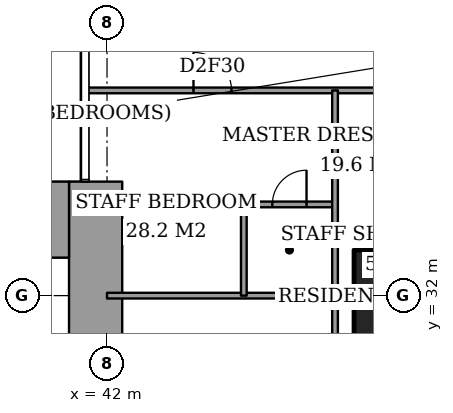
"""IFC4 building model, lengths in metres.
Left out: names, types, materials, properties, quantities, classifications, styles, units other than length and angle.
Written with IfcOpenShell. Run it as: python <this file> out.ifc"""

import sys

from ifc_helpers import new_model, si_unit, direction, frame, frame_2d, origin, origin_2d, place, context, subcontext, project, spatial, rectangle, extrude, element, fill, save


model = new_model("IFC4")
c1 = context("Model", 3, precision=1e-05, world=origin(), true_north=direction((0.0, 1.0)))
c2 = subcontext(c1, "Body", "Model", "MODEL_VIEW")
j1 = project(units=[si_unit("LENGTHUNIT", "METRE"), si_unit("PLANEANGLEUNIT", "RADIAN")], contexts=[c1])
p1 = place(None, origin())
s1 = spatial("IfcSite", under=j1, at=p1, CompositionType="ELEMENT")
p2 = place(p1, origin())
s2 = spatial("IfcBuilding", under=s1, at=p2, CompositionType="ELEMENT")
p3 = place(p2, frame((0.0, 0.0, 153.8)))
s3 = spatial("IfcBuildingStorey", under=s2, at=p3, CompositionType="ELEMENT", Elevation=153.8)
p4 = place(p3, frame((50.0, 32.0, 0.0), z_axis=(0.0, 0.0, 1.0), x_axis=(1.0, 0.0, 0.0)))
e1 = element("IfcColumn", 1, at=p4, inside=s3, PredefinedType="COLUMN", context=c2, shape_type="SweptSolid", body=[
    extrude(rectangle(XDim=3.0, YDim=2.4, at=origin_2d()), origin(), (0.0, 0.0, 1.0), 3.6),
])
p5 = place(p3, frame((37.85, 34.0, 0.0), z_axis=(0.0, 0.0, 1.0), x_axis=(1.0, 0.0, 0.0)))
e2 = element("IfcWall", 2, at=p5, inside=s3, PredefinedType="SHEAR", context=c2, shape_type="SweptSolid", body=[
    extrude(rectangle(XDim=3.15, YDim=2.0, at=frame_2d((1.575, 0.0))), origin(), (0.0, 0.0, 1.0), 3.6),
])
p6 = place(p3, frame((41.7, 24.85, 0.0), z_axis=(0.0, 0.0, 1.0), x_axis=(0.0, 1.0, 0.0)))
e3 = element("IfcWall", 3, at=p6, inside=s3, PredefinedType="SHEAR", context=c2, shape_type="SweptSolid", body=[
    extrude(rectangle(XDim=10.15, YDim=1.4, at=frame_2d((5.075, 0.0))), origin(), (0.0, 0.0, 1.0), 3.6),
])
p7 = place(p3, frame((48.0, 31.95, 0.0), z_axis=(0.0, 0.0, 1.0), x_axis=(1.0, 0.0, 0.0)))
e4 = element("IfcWall", 4, at=p7, inside=s3, PredefinedType="PARTITIONING", context=c2, shape_type="SweptSolid", body=[
    extrude(rectangle(XDim=0.5, YDim=0.15, at=frame_2d((0.25, 0.0))), origin(), (0.0, 0.0, 1.0), 2.634),
])
p8 = place(p3, frame((42.0, 32.0, 0.0), z_axis=(0.0, 0.0, 1.0), x_axis=(1.0, 0.0, 0.0)))
e5 = element("IfcWall", 5, at=p8, inside=s3, PredefinedType="PARTITIONING", context=c2, shape_type="SweptSolid", body=[
    extrude(rectangle(XDim=6.0, YDim=0.15, at=frame_2d((3.0, 0.0))), origin(), (0.0, 0.0, 1.0), 2.634),
])
p9 = place(p3, frame((45.6, 34.4, 0.0), z_axis=(0.0, 0.0, 1.0), x_axis=(1.0, 0.0, 0.0)))
e6 = element("IfcWall", 6, at=p9, inside=s3, PredefinedType="PARTITIONING", context=c2, shape_type="SweptSolid", body=[
    extrude(rectangle(XDim=2.4, YDim=0.15, at=frame_2d((1.2, 0.0))), origin(), (0.0, 0.0, 1.0), 3.35),
])
p10 = place(p9, frame((0.75, 0.0, 0.0)))
e7 = element("IfcOpeningElement", 7, at=p10, cuts=e6, PredefinedType="OPENING", context=c2, shape_type="SweptSolid", body=[
    extrude(rectangle(XDim=0.9, YDim=2.1, at=frame_2d((0.45, 1.05))), frame((0.0, 0.085, 0.0), z_axis=(0.0, -1.0, 0.0), x_axis=(1.0, 0.0, 0.0)), (0.0, 0.0, 1.0), 0.17),
])
p11 = place(p3, frame((41.439, 37.4, 0.0), z_axis=(0.0, 0.0, 1.0), x_axis=(1.0, 0.0, 0.0)))
e8 = element("IfcWall", 8, at=p11, inside=s3, PredefinedType="PARTITIONING", context=c2, shape_type="SweptSolid", body=[
    extrude(rectangle(XDim=25.011, YDim=0.15, at=frame_2d((12.505, 0.0))), origin(), (0.0, 0.0, 1.0), 3.35),
])
p12 = place(p11, frame((10.761, 0.0, 0.0)))
e9 = element("IfcOpeningElement", 9, at=p12, cuts=e8, PredefinedType="OPENING", context=c2, shape_type="SweptSolid", body=[
    extrude(rectangle(XDim=1.0, YDim=2.1, at=frame_2d((0.5, 1.05))), frame((0.0, 0.085, 0.0), z_axis=(0.0, -1.0, 0.0), x_axis=(1.0, 0.0, 0.0)), (0.0, 0.0, 1.0), 0.17),
])
p13 = place(p11, frame((20.924, 0.0, 0.0)))
e10 = element("IfcOpeningElement", 10, at=p13, cuts=e8, PredefinedType="OPENING", context=c2, shape_type="SweptSolid", body=[
    extrude(rectangle(XDim=1.0, YDim=2.1, at=frame_2d((0.5, 1.05))), frame((0.0, 0.085, 0.0), z_axis=(0.0, -1.0, 0.0), x_axis=(1.0, 0.0, 0.0)), (0.0, 0.0, 1.0), 0.17),
])
p14 = place(p11, frame((15.749, 0.0, 0.0)))
e11 = element("IfcOpeningElement", 11, at=p14, cuts=e8, PredefinedType="OPENING", context=c2, shape_type="SweptSolid", body=[
    extrude(rectangle(XDim=0.9, YDim=2.1, at=frame_2d((0.45, 1.05))), frame((0.0, 0.085, 0.0), z_axis=(0.0, -1.0, 0.0), x_axis=(1.0, 0.0, 0.0)), (0.0, 0.0, 1.0), 0.17),
])
p15 = place(p11, frame((12.961, 0.0, 0.0)))
e12 = element("IfcOpeningElement", 12, at=p15, cuts=e8, PredefinedType="OPENING", context=c2, shape_type="SweptSolid", body=[
    extrude(rectangle(XDim=1.0, YDim=2.1, at=frame_2d((0.5, 1.05))), frame((0.0, 0.085, 0.0), z_axis=(0.0, -1.0, 0.0), x_axis=(1.0, 0.0, 0.0)), (0.0, 0.0, 1.0), 0.17),
])
p16 = place(p11, frame((7.911, 0.0, 0.0)))
e13 = element("IfcOpeningElement", 13, at=p16, cuts=e8, PredefinedType="OPENING", context=c2, shape_type="SweptSolid", body=[
    extrude(rectangle(XDim=0.9, YDim=2.1, at=frame_2d((0.45, 1.05))), frame((0.0, 0.085, 0.0), z_axis=(0.0, -1.0, 0.0), x_axis=(1.0, 0.0, 0.0)), (0.0, 0.0, 1.0), 0.17),
])
p17 = place(p11, frame((2.836, 0.0, 0.0)))
e14 = element("IfcOpeningElement", 14, at=p17, cuts=e8, PredefinedType="OPENING", context=c2, shape_type="SweptSolid", body=[
    extrude(rectangle(XDim=1.0, YDim=2.1, at=frame_2d((0.5, 1.05))), frame((0.0, 0.085, 0.0), z_axis=(0.0, -1.0, 0.0), x_axis=(1.0, 0.0, 0.0)), (0.0, 0.0, 1.0), 0.17),
])
p18 = place(p3, frame((45.6, 32.0, 0.0), z_axis=(0.0, 0.0, 1.0), x_axis=(0.0, 1.0, 0.0)))
e15 = element("IfcWall", 15, at=p18, inside=s3, PredefinedType="PARTITIONING", context=c2, shape_type="SweptSolid", body=[
    extrude(rectangle(XDim=2.4, YDim=0.15, at=frame_2d((1.2, 0.0))), origin(), (0.0, 0.0, 1.0), 3.35),
])
p19 = place(p3, frame((48.0, 28.0, 0.0), z_axis=(0.0, 0.0, 1.0), x_axis=(0.0, 1.0, 0.0)))
e16 = element("IfcWall", 16, at=p19, inside=s3, PredefinedType="PARTITIONING", context=c2, shape_type="SweptSolid", body=[
    extrude(rectangle(XDim=9.4, YDim=0.15, at=frame_2d((4.7, 0.0))), origin(), (0.0, 0.0, 1.0), 3.35),
])
p20 = place(p19, frame((0.5, 0.0, 0.0)))
e17 = element("IfcOpeningElement", 17, at=p20, cuts=e16, PredefinedType="OPENING", context=c2, shape_type="SweptSolid", body=[
    extrude(rectangle(XDim=1.0, YDim=2.1, at=frame_2d((0.5, 1.05))), frame((0.0, 0.085, 0.0), z_axis=(0.0, -1.0, 0.0), x_axis=(1.0, 0.0, 0.0)), (0.0, 0.0, 1.0), 0.17),
])
p21 = place(p10, origin())
e18 = element("IfcDoor", 18, at=p21, inside=s3, OperationType="SINGLE_SWING_LEFT", PredefinedType="DOOR", context=c2, shape_type="SweptSolid", body=[
    extrude(rectangle(XDim=0.9, YDim=2.1, at=frame_2d((0.45, 1.05))), frame((0.0, 0.025, 0.0), z_axis=(0.0, -1.0, 0.0), x_axis=(1.0, 0.0, 0.0)), (0.0, 0.0, 1.0), 0.05),
])
fill(e7, e18)
p22 = place(p17, origin())
e19 = element("IfcDoor", 19, at=p22, inside=s3, OperationType="SINGLE_SWING_RIGHT", PredefinedType="DOOR", context=c2, shape_type="SweptSolid", body=[
    extrude(rectangle(XDim=1.0, YDim=2.1, at=frame_2d((0.5, 1.05))), frame((0.0, 0.025, 0.0), z_axis=(0.0, -1.0, 0.0), x_axis=(1.0, 0.0, 0.0)), (0.0, 0.0, 1.0), 0.05),
])
fill(e14, e19)
save(model, sys.argv[1])
